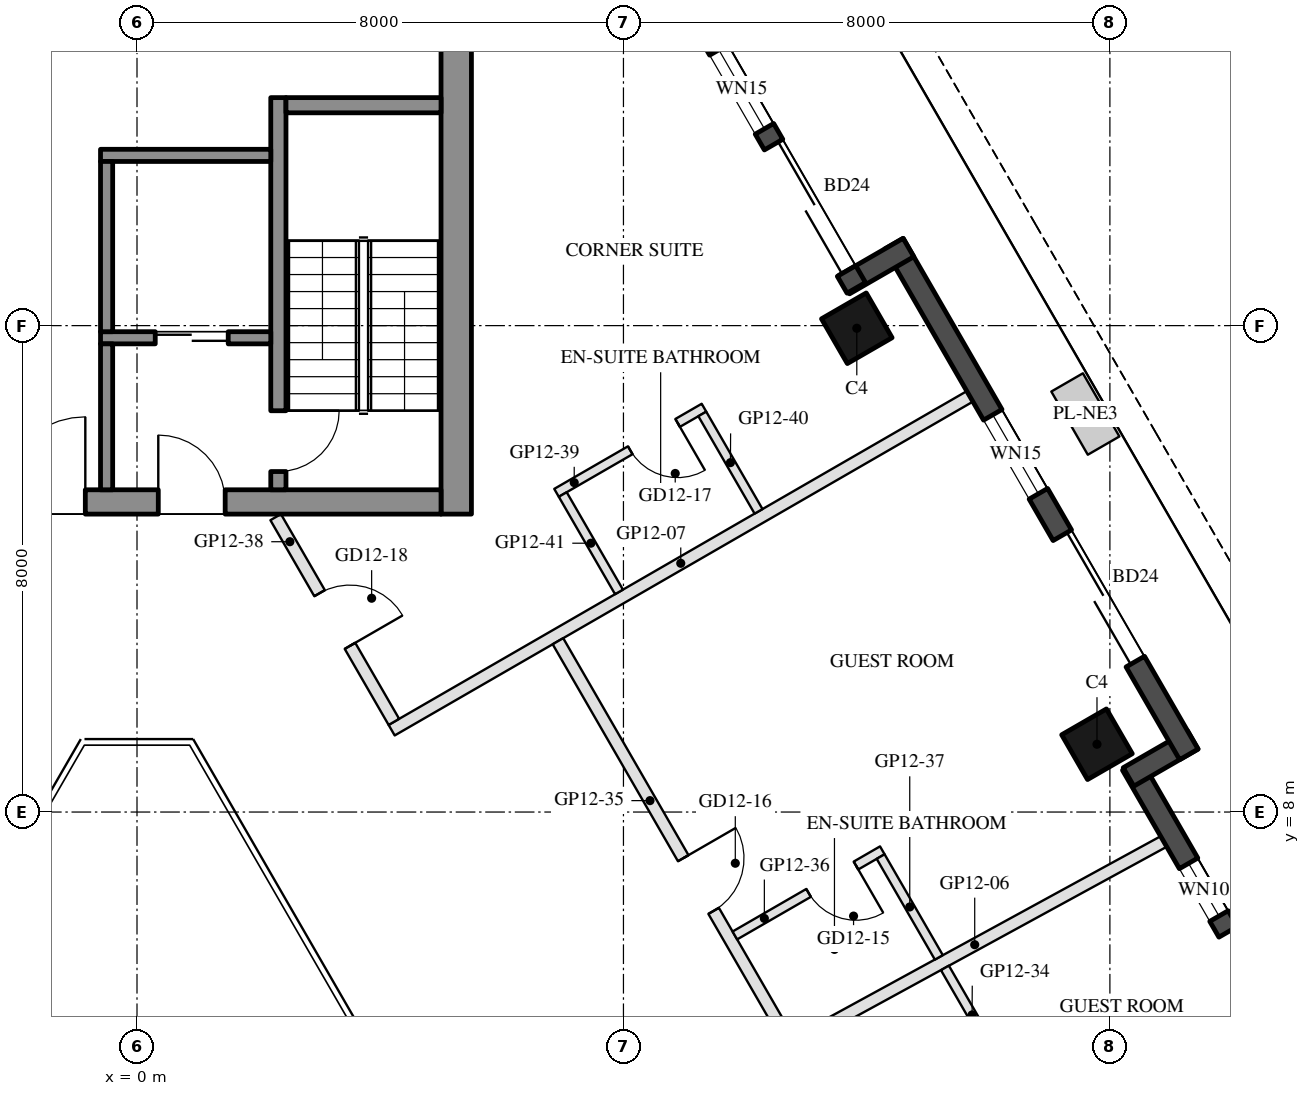
"""IFC4 building model, lengths in metres.
Left out: names, types, materials, properties, quantities, classifications, styles, units other than length and angle.
Written with IfcOpenShell. Run it as: python <this file> out.ifc"""

import sys

from ifc_helpers import new_model, si_unit, direction, frame, frame_2d, origin, origin_2d, place, context, subcontext, project, spatial, rectangle, hollow_rectangle, extrude, element, fill, save


model = new_model("IFC4")
c1 = context("Model", 3, precision=1e-05, world=origin(), true_north=direction((0.0, 1.0)))
c2 = subcontext(c1, "Body", "Model", "MODEL_VIEW")
j1 = project(units=[si_unit("LENGTHUNIT", "METRE"), si_unit("PLANEANGLEUNIT", "RADIAN")], contexts=[c1])
p1 = place(None, origin())
s1 = spatial("IfcSite", under=j1, at=p1, CompositionType="ELEMENT")
p2 = place(p1, origin())
s2 = spatial("IfcBuilding", under=s1, at=p2, CompositionType="ELEMENT")
p3 = place(p2, frame((0.0, 0.0, 150.3)))
s3 = spatial("IfcBuildingStorey", under=s2, at=p3, CompositionType="ELEMENT", Elevation=150.3)
for number, where, z_axis, x_axis in (
    (1, (15.788, 9.115, 0.0), (0.0, 0.0, 1.0), (-0.5, 0.866, 0.0)),
    (2, (11.838, 15.957, 0.0), (0.0, 0.0, 1.0), (-0.5, 0.866, 0.0)),
):
    element("IfcColumn", number, at=place(p3, frame(where, z_axis=z_axis, x_axis=x_axis)), inside=s3, PredefinedType="COLUMN", context=c2, shape_type="SweptSolid", body=[
        extrude(hollow_rectangle(XDim=0.85, YDim=0.85, WallThickness=0.04, at=origin_2d()), origin(), (0.0, 0.0, 1.0), 3.7),
    ])
p4 = place(p3, frame((19.729, 2.938, 0.0), z_axis=(0.0, 0.0, 1.0), x_axis=(-0.499976430342, 0.866039011305, 0.0)))
e3 = element("IfcWall", 3, at=p4, inside=s3, PredefinedType="SOLIDWALL", context=c2, shape_type="SweptSolid", body=[
    extrude(rectangle(XDim=6.74, YDim=0.35, at=frame_2d((3.37, 0.0))), origin(), (0.0, 0.0, 1.0), 3.55),
])
p5 = place(p4, frame((1.77, 0.0, 0.0)))
e4 = element("IfcOpeningElement", 4, at=p5, cuts=e3, PredefinedType="OPENING", context=c2, shape_type="SweptSolid", body=[
    extrude(rectangle(XDim=1.8, YDim=2.4, at=frame_2d((0.9, 1.2))), frame((0.0, 0.185, 0.0), z_axis=(0.0, -1.0, 0.0), x_axis=(1.0, 0.0, 0.0)), (0.0, 0.0, 1.0), 0.37),
])
p6 = place(p4, frame((3.87, 0.0, 0.3)))
e5 = element("IfcOpeningElement", 5, at=p6, cuts=e3, PredefinedType="OPENING", context=c2, shape_type="SweptSolid", body=[
    extrude(rectangle(XDim=1.0, YDim=2.65, at=frame_2d((0.5, 1.325))), frame((0.0, 0.185, 0.0), z_axis=(0.0, -1.0, 0.0), x_axis=(1.0, 0.0, 0.0)), (0.0, 0.0, 1.0), 0.37),
])
p7 = place(p3, frame((16.306, 8.577, 0.0), z_axis=(0.0, 0.0, 1.0), x_axis=(0.866092288191, 0.499884134912, 0.0)))
e6 = element("IfcWall", 6, at=p7, inside=s3, PredefinedType="SOLIDWALL", context=c2, shape_type="SweptSolid", body=[
    extrude(rectangle(XDim=1.22, YDim=0.35, at=frame_2d((0.61, 0.0))), origin(), (0.0, 0.0, 1.0), 3.55),
])
p8 = place(p3, frame((17.299, 8.948, 0.0), z_axis=(0.0, 0.0, 1.0), x_axis=(-0.500010041276, 0.866019606374, 0.0)))
e7 = element("IfcWall", 7, at=p8, inside=s3, PredefinedType="SOLIDWALL", context=c2, shape_type="SweptSolid", body=[
    extrude(rectangle(XDim=9.7, YDim=0.35, at=frame_2d((4.85, 0.0))), origin(), (0.0, 0.0, 1.0), 3.55),
])
p9 = place(p8, frame((1.762, 0.0, 0.0)))
e8 = element("IfcOpeningElement", 8, at=p9, cuts=e7, PredefinedType="OPENING", context=c2, shape_type="SweptSolid", body=[
    extrude(rectangle(XDim=2.4, YDim=2.4, at=frame_2d((1.2, 1.2))), frame((0.0, 0.185, 0.0), z_axis=(0.0, -1.0, 0.0), x_axis=(1.0, 0.0, 0.0)), (0.0, 0.0, 1.0), 0.37),
])
p10 = place(p8, frame((4.949, 0.0, 0.3)))
e9 = element("IfcOpeningElement", 9, at=p10, cuts=e7, PredefinedType="OPENING", context=c2, shape_type="SweptSolid", body=[
    extrude(rectangle(XDim=1.5, YDim=2.65, at=frame_2d((0.75, 1.325))), frame((0.0, 0.185, 0.0), z_axis=(0.0, -1.0, 0.0), x_axis=(1.0, 0.0, 0.0)), (0.0, 0.0, 1.0), 0.37),
])
p11 = place(p3, frame((12.688, 17.284, 0.0), z_axis=(0.0, 0.0, 1.0), x_axis=(-0.865955602162, -0.500120880472, 0.0)))
e10 = element("IfcWall", 10, at=p11, inside=s3, PredefinedType="SOLIDWALL", context=c2, shape_type="SweptSolid", body=[
    extrude(rectangle(XDim=1.22, YDim=0.35, at=frame_2d((0.61, 0.0))), origin(), (0.0, 0.0, 1.0), 3.55),
])
p12 = place(p3, frame((11.829, 16.621, 0.0), z_axis=(0.0, 0.0, 1.0), x_axis=(-0.500003597184, 0.866023326939, 0.0)))
e11 = element("IfcWall", 11, at=p12, inside=s3, PredefinedType="SOLIDWALL", context=c2, shape_type="SweptSolid", body=[
    extrude(rectangle(XDim=6.74, YDim=0.35, at=frame_2d((3.37, 0.0))), origin(), (0.0, 0.0, 1.0), 3.55),
])
p13 = place(p12, frame((0.32, 0.0, 0.0)))
e12 = element("IfcOpeningElement", 12, at=p13, cuts=e11, PredefinedType="OPENING", context=c2, shape_type="SweptSolid", body=[
    extrude(rectangle(XDim=2.4, YDim=2.4, at=frame_2d((1.2, 1.2))), frame((0.0, 0.185, 0.0), z_axis=(0.0, -1.0, 0.0), x_axis=(1.0, 0.0, 0.0)), (0.0, 0.0, 1.0), 0.37),
])
p14 = place(p12, frame((3.02, 0.0, 0.3)))
e13 = element("IfcOpeningElement", 13, at=p14, cuts=e11, PredefinedType="OPENING", context=c2, shape_type="SweptSolid", body=[
    extrude(rectangle(XDim=1.5, YDim=2.65, at=frame_2d((0.75, 1.325))), frame((0.0, 0.185, 0.0), z_axis=(0.0, -1.0, 0.0), x_axis=(1.0, 0.0, 0.0)), (0.0, 0.0, 1.0), 0.37),
])
p15 = place(p12, frame((4.82, 0.0, 0.3)))
e14 = element("IfcOpeningElement", 14, at=p15, cuts=e11, PredefinedType="OPENING", context=c2, shape_type="SweptSolid", body=[
    extrude(rectangle(XDim=1.5, YDim=2.65, at=frame_2d((0.75, 1.325))), frame((0.0, 0.185, 0.0), z_axis=(0.0, -1.0, 0.0), x_axis=(1.0, 0.0, 0.0)), (0.0, 0.0, 1.0), 0.37),
])
p16 = place(p3, frame((5.25, 12.9, 0.0), z_axis=(0.0, 0.0, 1.0), x_axis=(0.0, 1.0, 0.0)))
e15 = element("IfcWall", 15, at=p16, inside=s3, PredefinedType="SHEAR", context=c2, shape_type="SweptSolid", body=[
    extrude(rectangle(XDim=14.837, YDim=0.5, at=frame_2d((7.418, 0.0))), origin(), (0.0, 0.0, 1.0), 3.5),
])
p17 = place(p3, frame((5.0, 13.1, 0.0), z_axis=(0.0, 0.0, 1.0), x_axis=(-1.0, 0.0, 0.0)))
e16 = element("IfcWall", 16, at=p17, inside=s3, PredefinedType="SHEAR", context=c2, shape_type="SweptSolid", body=[
    extrude(rectangle(XDim=10.0, YDim=0.4, at=frame_2d((5.0, 0.0))), origin(), (0.0, 0.0, 1.0), 3.5),
])
p18 = place(p17, frame((3.55, 0.0, 0.0)))
e17 = element("IfcOpeningElement", 17, at=p18, cuts=e16, PredefinedType="OPENING", context=c2, shape_type="SweptSolid", body=[
    extrude(rectangle(XDim=1.1, YDim=2.1, at=frame_2d((0.55, 1.05))), frame((0.0, 0.21, 0.0), z_axis=(0.0, -1.0, 0.0), x_axis=(1.0, 0.0, 0.0)), (0.0, 0.0, 1.0), 0.42),
])
p19 = place(p17, frame((5.85, 0.0, 0.0)))
e18 = element("IfcOpeningElement", 18, at=p19, cuts=e16, PredefinedType="OPENING", context=c2, shape_type="SweptSolid", body=[
    extrude(rectangle(XDim=1.4, YDim=2.1, at=frame_2d((0.7, 1.05))), frame((0.0, 0.21, 0.0), z_axis=(0.0, -1.0, 0.0), x_axis=(1.0, 0.0, 0.0)), (0.0, 0.0, 1.0), 0.42),
])
p20 = place(p3, frame((2.325, 13.3, 0.0), z_axis=(0.0, 0.0, 1.0), x_axis=(0.0, 1.0, 0.0)))
e19 = element("IfcWall", 19, at=p20, inside=s3, PredefinedType="SHEAR", context=c2, shape_type="SweptSolid", body=[
    extrude(rectangle(XDim=6.45, YDim=0.25, at=frame_2d((3.225, 0.0))), origin(), (0.0, 0.0, 1.0), 3.5),
])
p21 = place(p20, frame((0.3, 0.0, 0.0)))
e20 = element("IfcOpeningElement", 20, at=p21, cuts=e19, PredefinedType="OPENING", context=c2, shape_type="SweptSolid", body=[
    extrude(rectangle(XDim=1.0, YDim=2.1, at=frame_2d((0.5, 1.05))), frame((0.0, 0.135, 0.0), z_axis=(0.0, -1.0, 0.0), x_axis=(1.0, 0.0, 0.0)), (0.0, 0.0, 1.0), 0.27),
])
p22 = place(p3, frame((5.0, 19.625, 0.0), z_axis=(0.0, 0.0, 1.0), x_axis=(-1.0, 0.0, 0.0)))
e21 = element("IfcWall", 21, at=p22, inside=s3, PredefinedType="SHEAR", context=c2, shape_type="SweptSolid", body=[
    extrude(rectangle(XDim=2.55, YDim=0.25, at=frame_2d((1.275, 0.0))), origin(), (0.0, 0.0, 1.0), 3.5),
])
p23 = place(p3, frame((2.2, 18.8, 0.0), z_axis=(0.0, 0.0, 1.0), x_axis=(-1.0, 0.0, 0.0)))
e22 = element("IfcWall", 22, at=p23, inside=s3, PredefinedType="SHEAR", context=c2, shape_type="SweptSolid", body=[
    extrude(rectangle(XDim=2.8, YDim=0.2, at=frame_2d((1.4, 0.0))), origin(), (0.0, 0.0, 1.0), 3.5),
])
p24 = place(p3, frame((2.2, 15.8, 0.0), z_axis=(0.0, 0.0, 1.0), x_axis=(-1.0, 0.0, 0.0)))
e23 = element("IfcWall", 23, at=p24, inside=s3, PredefinedType="SHEAR", context=c2, shape_type="SweptSolid", body=[
    extrude(rectangle(XDim=2.8, YDim=0.2, at=frame_2d((1.4, 0.0))), origin(), (0.0, 0.0, 1.0), 3.5),
])
p25 = place(p24, frame((0.7, 0.0, 0.0)))
e24 = element("IfcOpeningElement", 24, at=p25, cuts=e23, PredefinedType="OPENING", context=c2, shape_type="SweptSolid", body=[
    extrude(rectangle(XDim=1.2, YDim=2.1, at=frame_2d((0.6, 1.05))), frame((0.0, 0.11, 0.0), z_axis=(0.0, -1.0, 0.0), x_axis=(1.0, 0.0, 0.0)), (0.0, 0.0, 1.0), 0.22),
])
p26 = place(p3, frame((-0.5, 15.9, 0.0), z_axis=(0.0, 0.0, 1.0), x_axis=(0.0, 1.0, 0.0)))
e25 = element("IfcWall", 25, at=p26, inside=s3, PredefinedType="SHEAR", context=c2, shape_type="SweptSolid", body=[
    extrude(rectangle(XDim=2.8, YDim=0.2, at=frame_2d((1.4, 0.0))), origin(), (0.0, 0.0, 1.0), 3.5),
])
p27 = place(p3, frame((-0.5, 13.3, 0.0), z_axis=(0.0, 0.0, 1.0), x_axis=(0.0, 1.0, 0.0)))
e26 = element("IfcWall", 26, at=p27, inside=s3, PredefinedType="SHEAR", context=c2, shape_type="SweptSolid", body=[
    extrude(rectangle(XDim=2.4, YDim=0.2, at=frame_2d((1.2, 0.0))), origin(), (0.0, 0.0, 1.0), 3.5),
])
p28 = place(p3, frame((16.885, 7.515, 0.0), z_axis=(0.0, 0.0, 1.0), x_axis=(-0.87760821498, -0.479378577952, 0.0)))
e27 = element("IfcWall", 27, at=p28, inside=s3, PredefinedType="PARTITIONING", context=c2, shape_type="SweptSolid", body=[
    extrude(rectangle(XDim=7.082, YDim=0.2, at=frame_2d((3.541, 0.0))), origin(), (0.0, 0.0, 1.0), 3.06),
])
p29 = place(p3, frame((13.697, 14.836, 0.0), z_axis=(0.0, 0.0, 1.0), x_axis=(-0.866027479907, -0.499996404033, 0.0)))
e28 = element("IfcWall", 28, at=p29, inside=s3, PredefinedType="PARTITIONING", context=c2, shape_type="SweptSolid", body=[
    extrude(rectangle(XDim=10.98, YDim=0.2, at=frame_2d((5.49, 0.0))), origin(), (0.0, 0.0, 1.0), 3.06),
])
p30 = place(p3, frame((14.18, 3.89, 0.0), z_axis=(0.0, 0.0, 1.0), x_axis=(-0.500006500783, 0.866021650523, 0.0)))
e29 = element("IfcWall", 29, at=p30, inside=s3, PredefinedType="PARTITIONING", context=c2, shape_type="SweptSolid", body=[
    extrude(rectangle(XDim=1.786, YDim=0.15, at=frame_2d((0.893, 0.0))), origin(), (0.0, 0.0, 1.0), 3.55),
])
p31 = place(p3, frame((6.923, 10.81, 0.0), z_axis=(0.0, 0.0, 1.0), x_axis=(0.500007257026, -0.866021213898, 0.0)))
e30 = element("IfcWall", 30, at=p31, inside=s3, PredefinedType="PARTITIONING", context=c2, shape_type="SweptSolid", body=[
    extrude(rectangle(XDim=7.569, YDim=0.2, at=frame_2d((3.784, 0.0))), origin(), (0.0, 0.0, 1.0), 2.95),
])
p32 = place(p31, frame((4.121, 0.0, 0.0)))
e31 = element("IfcOpeningElement", 31, at=p32, cuts=e30, PredefinedType="OPENING", context=c2, shape_type="SweptSolid", body=[
    extrude(rectangle(XDim=1.0, YDim=2.1, at=frame_2d((0.5, 1.05))), frame((0.0, 0.11, 0.0), z_axis=(0.0, -1.0, 0.0), x_axis=(1.0, 0.0, 0.0)), (0.0, 0.0, 1.0), 0.22),
])
p33 = place(p3, frame((12.257, 7.37, 0.0), z_axis=(0.0, 0.0, 1.0), x_axis=(-0.865996816683, -0.500049511043, 0.0)))
e32 = element("IfcWall", 32, at=p33, inside=s3, PredefinedType="PARTITIONING", context=c2, shape_type="SweptSolid", body=[
    extrude(rectangle(XDim=2.8, YDim=0.15, at=frame_2d((1.4, 0.0))), origin(), (0.0, 0.0, 1.0), 3.55),
])
p34 = place(p33, frame((0.5, 0.0, 0.0)))
e33 = element("IfcOpeningElement", 33, at=p34, cuts=e32, PredefinedType="OPENING", context=c2, shape_type="SweptSolid", body=[
    extrude(rectangle(XDim=0.9, YDim=2.1, at=frame_2d((0.45, 1.05))), frame((0.0, 0.085, 0.0), z_axis=(0.0, -1.0, 0.0), x_axis=(1.0, 0.0, 0.0)), (0.0, 0.0, 1.0), 0.17),
])
p35 = place(p3, frame((13.187, 5.61, 0.0), z_axis=(0.0, 0.0, 1.0), x_axis=(-0.500020498207, 0.866013568815, 0.0)))
e34 = element("IfcWall", 34, at=p35, inside=s3, PredefinedType="PARTITIONING", context=c2, shape_type="SweptSolid", body=[
    extrude(rectangle(XDim=1.915, YDim=0.15, at=frame_2d((0.957, 0.0))), origin(), (0.0, 0.0, 1.0), 2.95),
])
p36 = place(p3, frame((2.281, 12.85, 0.0), z_axis=(0.0, 0.0, 1.0), x_axis=(0.500008716408, -0.866020371305, 0.0)))
e35 = element("IfcWall", 35, at=p36, inside=s3, PredefinedType="PARTITIONING", context=c2, shape_type="SweptSolid", body=[
    extrude(rectangle(XDim=3.888, YDim=0.2, at=frame_2d((1.944, 0.0))), origin(), (0.0, 0.0, 1.0), 2.95),
])
p37 = place(p36, frame((1.444, 0.0, 0.0)))
e36 = element("IfcOpeningElement", 36, at=p37, cuts=e35, PredefinedType="OPENING", context=c2, shape_type="SweptSolid", body=[
    extrude(rectangle(XDim=1.0, YDim=2.1, at=frame_2d((0.5, 1.05))), frame((0.0, 0.11, 0.0), z_axis=(0.0, -1.0, 0.0), x_axis=(1.0, 0.0, 0.0)), (0.0, 0.0, 1.0), 0.22),
])
p38 = place(p3, frame((9.324, 14.65, 0.0), z_axis=(0.0, 0.0, 1.0), x_axis=(-0.866034573852, -0.49998411664, 0.0)))
e37 = element("IfcWall", 37, at=p38, inside=s3, PredefinedType="PARTITIONING", context=c2, shape_type="SweptSolid", body=[
    extrude(rectangle(XDim=2.8, YDim=0.15, at=frame_2d((1.4, 0.0))), origin(), (0.0, 0.0, 1.0), 2.95),
])
p39 = place(p38, frame((0.5, 0.0, 0.0)))
e38 = element("IfcOpeningElement", 38, at=p39, cuts=e37, PredefinedType="OPENING", context=c2, shape_type="SweptSolid", body=[
    extrude(rectangle(XDim=0.9, YDim=2.1, at=frame_2d((0.45, 1.05))), frame((0.0, 0.085, 0.0), z_axis=(0.0, -1.0, 0.0), x_axis=(1.0, 0.0, 0.0)), (0.0, 0.0, 1.0), 0.17),
])
for number, where, z_axis, x_axis in (
    (39, (10.222, 12.945, 0.0), (0.0, 0.0, 1.0), (-0.5, 0.866, 0.0)),
    (40, (7.927, 11.62, 0.0), (0.0, 0.0, 1.0), (-0.5, 0.866, 0.0)),
):
    element("IfcWall", number, at=place(p3, frame(where, z_axis=z_axis, x_axis=x_axis)), inside=s3, PredefinedType="PARTITIONING", context=c2, shape_type="SweptSolid", body=[
        extrude(rectangle(XDim=1.85, YDim=0.15, at=frame_2d((0.925, 0.0))), origin(), (0.0, 0.0, 1.0), 2.95),
    ])
p40 = place(p5, frame((1.8, 0.0, 0.0), z_axis=(0.0, 0.0, 1.0), x_axis=(-1.0, 0.0, 0.0)))
e41 = element("IfcDoor", 41, at=p40, inside=s3, OperationType="SLIDING_TO_LEFT", PredefinedType="DOOR", context=c2, shape_type="SweptSolid", body=[
    extrude(rectangle(XDim=1.8, YDim=2.4, at=frame_2d((0.9, 1.2))), frame((0.0, 0.025, 0.0), z_axis=(0.0, -1.0, 0.0), x_axis=(1.0, 0.0, 0.0)), (0.0, 0.0, 1.0), 0.05),
])
fill(e4, e41)
p41 = place(p6, origin())
e42 = element("IfcWindow", 42, at=p41, inside=s3, PartitioningType="SINGLE_PANEL", PredefinedType="WINDOW", context=c2, shape_type="SweptSolid", body=[
    extrude(rectangle(XDim=1.0, YDim=2.65, at=frame_2d((0.5, 1.325))), frame((0.0, 0.03, 0.0), z_axis=(0.0, -1.0, 0.0), x_axis=(1.0, 0.0, 0.0)), (0.0, 0.0, 1.0), 0.06),
])
fill(e5, e42)
p42 = place(p9, frame((2.4, 0.0, 0.0), z_axis=(0.0, 0.0, 1.0), x_axis=(-1.0, 0.0, 0.0)))
e43 = element("IfcDoor", 43, at=p42, inside=s3, OperationType="SLIDING_TO_LEFT", PredefinedType="DOOR", context=c2, shape_type="SweptSolid", body=[
    extrude(rectangle(XDim=2.4, YDim=2.4, at=frame_2d((1.2, 1.2))), frame((0.0, 0.025, 0.0), z_axis=(0.0, -1.0, 0.0), x_axis=(1.0, 0.0, 0.0)), (0.0, 0.0, 1.0), 0.05),
])
fill(e8, e43)
p43 = place(p10, origin())
e44 = element("IfcWindow", 44, at=p43, inside=s3, PartitioningType="SINGLE_PANEL", PredefinedType="WINDOW", context=c2, shape_type="SweptSolid", body=[
    extrude(rectangle(XDim=1.5, YDim=2.65, at=frame_2d((0.75, 1.325))), frame((0.0, 0.03, 0.0), z_axis=(0.0, -1.0, 0.0), x_axis=(1.0, 0.0, 0.0)), (0.0, 0.0, 1.0), 0.06),
])
fill(e9, e44)
p44 = place(p13, frame((2.4, 0.0, 0.0), z_axis=(0.0, 0.0, 1.0), x_axis=(-1.0, 0.0, 0.0)))
e45 = element("IfcDoor", 45, at=p44, inside=s3, OperationType="SLIDING_TO_LEFT", PredefinedType="DOOR", context=c2, shape_type="SweptSolid", body=[
    extrude(rectangle(XDim=2.4, YDim=2.4, at=frame_2d((1.2, 1.2))), frame((0.0, 0.025, 0.0), z_axis=(0.0, -1.0, 0.0), x_axis=(1.0, 0.0, 0.0)), (0.0, 0.0, 1.0), 0.05),
])
fill(e12, e45)
p45 = place(p14, origin())
e46 = element("IfcWindow", 46, at=p45, inside=s3, PartitioningType="SINGLE_PANEL", PredefinedType="WINDOW", context=c2, shape_type="SweptSolid", body=[
    extrude(rectangle(XDim=1.5, YDim=2.65, at=frame_2d((0.75, 1.325))), frame((0.0, 0.03, 0.0), z_axis=(0.0, -1.0, 0.0), x_axis=(1.0, 0.0, 0.0)), (0.0, 0.0, 1.0), 0.06),
])
fill(e13, e46)
p46 = place(p25, origin())
e47 = element("IfcDoor", 47, at=p46, inside=s3, OperationType="DOUBLE_DOOR_SLIDING", PredefinedType="DOOR", context=c2, shape_type="SweptSolid", body=[
    extrude(rectangle(XDim=1.2, YDim=2.1, at=frame_2d((0.6, 1.05))), frame((0.0, 0.025, 0.0), z_axis=(0.0, -1.0, 0.0), x_axis=(1.0, 0.0, 0.0)), (0.0, 0.0, 1.0), 0.05),
])
fill(e24, e47)
p47 = place(p18, frame((1.1, 0.0, 0.0), z_axis=(0.0, 0.0, 1.0), x_axis=(-1.0, 0.0, 0.0)))
e48 = element("IfcDoor", 48, at=p47, inside=s3, OperationType="SINGLE_SWING_LEFT", PredefinedType="DOOR", context=c2, shape_type="SweptSolid", body=[
    extrude(rectangle(XDim=1.1, YDim=2.1, at=frame_2d((0.55, 1.05))), frame((0.0, 0.025, 0.0), z_axis=(0.0, -1.0, 0.0), x_axis=(1.0, 0.0, 0.0)), (0.0, 0.0, 1.0), 0.05),
])
fill(e17, e48)
p48 = place(p19, frame((1.4, 0.0, 0.0), z_axis=(0.0, 0.0, 1.0), x_axis=(-1.0, 0.0, 0.0)))
e49 = element("IfcDoor", 49, at=p48, inside=s3, OperationType="DOUBLE_DOOR_SINGLE_SWING", PredefinedType="DOOR", context=c2, shape_type="SweptSolid", body=[
    extrude(rectangle(XDim=1.4, YDim=2.1, at=frame_2d((0.7, 1.05))), frame((0.0, 0.025, 0.0), z_axis=(0.0, -1.0, 0.0), x_axis=(1.0, 0.0, 0.0)), (0.0, 0.0, 1.0), 0.05),
])
fill(e18, e49)
p49 = place(p21, frame((1.0, 0.0, 0.0), z_axis=(0.0, 0.0, 1.0), x_axis=(-1.0, 0.0, 0.0)))
e50 = element("IfcDoor", 50, at=p49, inside=s3, OperationType="SINGLE_SWING_LEFT", PredefinedType="DOOR", context=c2, shape_type="SweptSolid", body=[
    extrude(rectangle(XDim=1.0, YDim=2.1, at=frame_2d((0.5, 1.05))), frame((0.0, 0.025, 0.0), z_axis=(0.0, -1.0, 0.0), x_axis=(1.0, 0.0, 0.0)), (0.0, 0.0, 1.0), 0.05),
])
fill(e20, e50)
p50 = place(p34, origin())
e51 = element("IfcDoor", 51, at=p50, inside=s3, OperationType="SINGLE_SWING_LEFT", PredefinedType="DOOR", context=c2, shape_type="SweptSolid", body=[
    extrude(rectangle(XDim=0.9, YDim=2.1, at=frame_2d((0.45, 1.05))), frame((0.0, 0.025, 0.0), z_axis=(0.0, -1.0, 0.0), x_axis=(1.0, 0.0, 0.0)), (0.0, 0.0, 1.0), 0.05),
])
fill(e33, e51)
p51 = place(p32, origin())
e52 = element("IfcDoor", 52, at=p51, inside=s3, OperationType="SINGLE_SWING_LEFT", PredefinedType="DOOR", context=c2, shape_type="SweptSolid", body=[
    extrude(rectangle(XDim=1.0, YDim=2.1, at=frame_2d((0.5, 1.05))), frame((0.0, 0.025, 0.0), z_axis=(0.0, -1.0, 0.0), x_axis=(1.0, 0.0, 0.0)), (0.0, 0.0, 1.0), 0.05),
])
fill(e31, e52)
p52 = place(p39, origin())
e53 = element("IfcDoor", 53, at=p52, inside=s3, OperationType="SINGLE_SWING_LEFT", PredefinedType="DOOR", context=c2, shape_type="SweptSolid", body=[
    extrude(rectangle(XDim=0.9, YDim=2.1, at=frame_2d((0.45, 1.05))), frame((0.0, 0.025, 0.0), z_axis=(0.0, -1.0, 0.0), x_axis=(1.0, 0.0, 0.0)), (0.0, 0.0, 1.0), 0.05),
])
fill(e38, e53)
p53 = place(p37, origin())
e54 = element("IfcDoor", 54, at=p53, inside=s3, OperationType="SINGLE_SWING_RIGHT", PredefinedType="DOOR", context=c2, shape_type="SweptSolid", body=[
    extrude(rectangle(XDim=1.0, YDim=2.1, at=frame_2d((0.5, 1.05))), frame((0.0, 0.025, 0.0), z_axis=(0.0, -1.0, 0.0), x_axis=(1.0, 0.0, 0.0)), (0.0, 0.0, 1.0), 0.05),
])
fill(e36, e54)
save(model, sys.argv[1])
